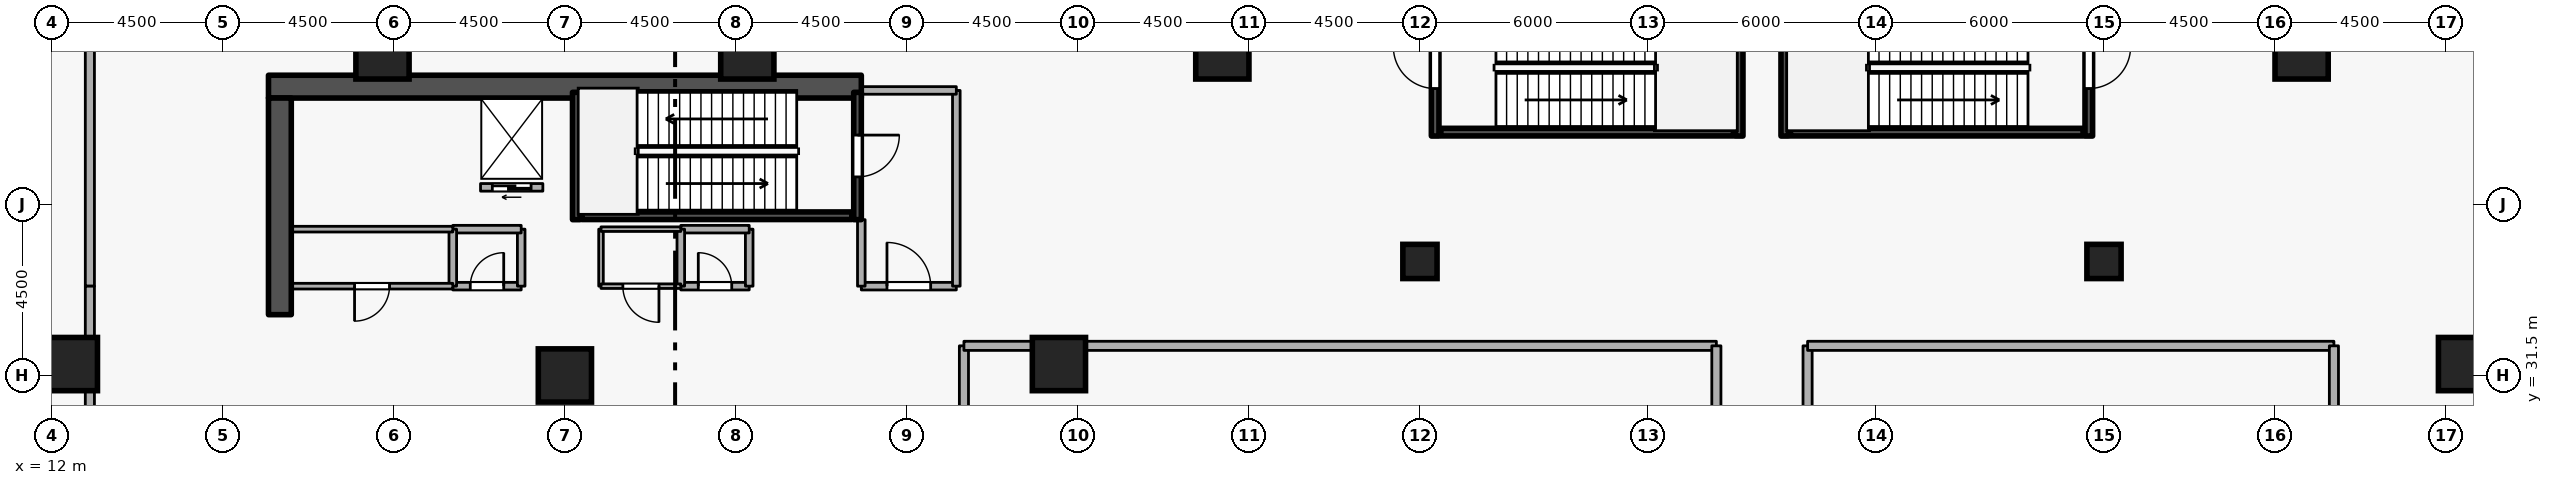
"""IFC4 building model, lengths in metres.
Left out: names, types, materials, properties, quantities, classifications, styles, units other than length and angle.
Written with IfcOpenShell. Run it as: python <this file> out.ifc"""

import sys

from ifc_helpers import new_model, si_unit, direction, frame, frame_2d, origin, origin_2d, place, context, subcontext, project, spatial, rectangle, extrude, element, fill, save


model = new_model("IFC4")
c1 = context("Model", 3, precision=1e-05, world=origin(), true_north=direction((0.0, 1.0)))
c2 = subcontext(c1, "Body", "Model", "MODEL_VIEW")
j1 = project(units=[si_unit("LENGTHUNIT", "METRE"), si_unit("PLANEANGLEUNIT", "RADIAN")], contexts=[c1])
p1 = place(None, origin())
s1 = spatial("IfcSite", under=j1, at=p1, CompositionType="ELEMENT")
p2 = place(p1, origin())
s2 = spatial("IfcBuilding", under=s1, at=p2, CompositionType="ELEMENT")
p3 = place(p2, frame((0.0, 0.0, -5.4)))
s3 = spatial("IfcBuildingStorey", under=s2, at=p3, CompositionType="ELEMENT", Elevation=-5.4)
p4 = place(p3, frame((17.7, 39.1, -0.6), z_axis=(0.0, 0.0, 1.0), x_axis=(1.0, 0.0, 0.0)))
e1 = element("IfcWall", 1, at=p4, inside=s3, PredefinedType="SHEAR", context=c2, shape_type="SweptSolid", body=[
    extrude(rectangle(XDim=15.6, YDim=0.6, at=frame_2d((7.8, 0.0))), origin(), (0.0, 0.0, 1.0), 6.0),
])
p5 = place(p3, frame((18.0, 33.1, -0.6), z_axis=(0.0, 0.0, 1.0), x_axis=(0.0, 1.0, 0.0)))
e2 = element("IfcWall", 2, at=p5, inside=s3, PredefinedType="SHEAR", context=c2, shape_type="SweptSolid", body=[
    extrude(rectangle(XDim=5.7, YDim=0.6, at=frame_2d((2.85, 0.0))), origin(), (0.0, 0.0, 1.0), 6.0),
])
for number, where, z_axis, x_axis in (
    (3, (42.8, 40.0, -0.6), (0.0, 0.0, 1.0), (1.0, 0.0, 0.0)),
    (4, (12.5, 31.8, -0.6), (0.0, 0.0, 1.0), (1.0, 0.0, 0.0)),
    (5, (38.5, 31.8, -0.6), (0.0, 0.0, 1.0), (1.0, 0.0, 0.0)),
    (6, (20.7, 40.0, -0.6), (0.0, 0.0, 1.0), (1.0, 0.0, 0.0)),
    (7, (30.3, 40.0, -0.6), (0.0, 0.0, 1.0), (1.0, 0.0, 0.0)),
    (8, (25.5, 31.5, -0.6), (0.0, 0.0, 1.0), (1.0, 0.0, 0.0)),
    (9, (71.2, 40.0, -0.6), (0.0, 0.0, 1.0), (1.0, 0.0, 0.0)),
    (10, (75.5, 31.8, -0.6), (0.0, 0.0, 1.0), (1.0, 0.0, 0.0)),
):
    element("IfcColumn", number, at=place(p3, frame(where, z_axis=z_axis, x_axis=x_axis)), inside=s3, PredefinedType="COLUMN", context=c2, shape_type="SweptSolid", body=[
        extrude(rectangle(XDim=1.4, YDim=1.4, at=origin_2d()), origin(), (0.0, 0.0, 1.0), 6.0),
    ])
for number, where, z_axis, x_axis in (
    (11, (48.0, 34.5, -0.6), (0.0, 0.0, 1.0), (1.0, 0.0, 0.0)),
    (12, (66.0, 34.5, -0.6), (0.0, 0.0, 1.0), (1.0, 0.0, 0.0)),
):
    element("IfcColumn", number, at=place(p3, frame(where, z_axis=z_axis, x_axis=x_axis)), inside=s3, PredefinedType="COLUMN", context=c2, shape_type="SweptSolid", body=[
        extrude(rectangle(XDim=0.9, YDim=0.9, at=origin_2d()), origin(), (0.0, 0.0, 1.0), 6.0),
    ])
p6 = place(p3, frame((24.92, 36.45, 0.0), z_axis=(0.0, 0.0, 1.0), x_axis=(-1.0, 0.0, 0.0)))
e13 = element("IfcWall", 13, at=p6, inside=s3, PredefinedType="STANDARD", context=c2, shape_type="SweptSolid", body=[
    extrude(rectangle(XDim=1.64, YDim=0.2, at=frame_2d((0.82, 0.0))), origin(), (0.0, 0.0, 1.0), 5.06),
])
p7 = place(p6, frame((0.31, 0.0, 0.0)))
e14 = element("IfcOpeningElement", 14, at=p7, cuts=e13, PredefinedType="OPENING", context=c2, shape_type="SweptSolid", body=[
    extrude(rectangle(XDim=1.02, YDim=2.06, at=frame_2d((0.51, 1.03))), frame((0.0, 0.11, 0.0), z_axis=(0.0, -1.0, 0.0), x_axis=(1.0, 0.0, 0.0)), (0.0, 0.0, 1.0), 0.22),
])
p8 = place(p3, frame((33.2, 38.95, -0.6), z_axis=(0.0, 0.0, 1.0), x_axis=(0.0, -1.0, 0.0)))
e15 = element("IfcWall", 15, at=p8, inside=s3, PredefinedType="SHEAR", context=c2, shape_type="SweptSolid", body=[
    extrude(rectangle(XDim=3.35, YDim=0.2, at=frame_2d((1.675, 0.0))), origin(), (0.0, 0.0, 1.0), 6.0),
])
p9 = place(p8, frame((1.125, 0.0, 0.6)))
e16 = element("IfcOpeningElement", 16, at=p9, cuts=e15, PredefinedType="OPENING", context=c2, shape_type="SweptSolid", body=[
    extrude(rectangle(XDim=1.1, YDim=2.1, at=frame_2d((0.55, 1.05))), frame((0.0, 0.11, 0.0), z_axis=(0.0, -1.0, 0.0), x_axis=(1.0, 0.0, 0.0)), (0.0, 0.0, 1.0), 0.22),
])
p10 = place(p3, frame((25.8, 35.6, -0.6), z_axis=(0.0, 0.0, 1.0), x_axis=(0.0, 1.0, 0.0)))
e17 = element("IfcWall", 17, at=p10, inside=s3, PredefinedType="SHEAR", context=c2, shape_type="SweptSolid", body=[
    extrude(rectangle(XDim=3.35, YDim=0.2, at=frame_2d((1.675, 0.0))), origin(), (0.0, 0.0, 1.0), 6.0),
])
p11 = place(p3, frame((25.95, 35.703, -0.6), z_axis=(0.0, 0.0, 1.0), x_axis=(1.0, 0.0, 0.0)))
e18 = element("IfcWall", 18, at=p11, inside=s3, PredefinedType="SHEAR", context=c2, shape_type="SweptSolid", body=[
    extrude(rectangle(XDim=7.1, YDim=0.2, at=frame_2d((3.55, 0.0))), origin(), (0.0, 0.0, 1.0), 6.0),
])
p12 = place(p3, frame((48.4, 37.8, -0.6), z_axis=(0.0, 0.0, 1.0), x_axis=(0.0, 1.0, 0.0)))
e19 = element("IfcWall", 19, at=p12, inside=s3, PredefinedType="SHEAR", context=c2, shape_type="SweptSolid", body=[
    extrude(rectangle(XDim=3.6, YDim=0.2, at=frame_2d((1.8, 0.0))), origin(), (0.0, 0.0, 1.0), 6.0),
])
p13 = place(p12, frame((1.25, 0.0, 0.6)))
e20 = element("IfcOpeningElement", 20, at=p13, cuts=e19, PredefinedType="OPENING", context=c2, shape_type="SweptSolid", body=[
    extrude(rectangle(XDim=1.1, YDim=2.1, at=frame_2d((0.55, 1.05))), frame((0.0, 0.11, 0.0), z_axis=(0.0, -1.0, 0.0), x_axis=(1.0, 0.0, 0.0)), (0.0, 0.0, 1.0), 0.22),
])
p14 = place(p3, frame((56.4, 41.4, -0.6), z_axis=(0.0, 0.0, 1.0), x_axis=(0.0, -1.0, 0.0)))
e21 = element("IfcWall", 21, at=p14, inside=s3, PredefinedType="SHEAR", context=c2, shape_type="SweptSolid", body=[
    extrude(rectangle(XDim=3.6, YDim=0.2, at=frame_2d((1.8, 0.0))), origin(), (0.0, 0.0, 1.0), 6.0),
])
p15 = place(p3, frame((48.55, 37.903, -0.6), z_axis=(0.0, 0.0, 1.0), x_axis=(1.0, 0.0, 0.0)))
e22 = element("IfcWall", 22, at=p15, inside=s3, PredefinedType="SHEAR", context=c2, shape_type="SweptSolid", body=[
    extrude(rectangle(XDim=7.7, YDim=0.2, at=frame_2d((3.85, 0.0))), origin(), (0.0, 0.0, 1.0), 6.0),
])
p16 = place(p3, frame((65.6, 41.4, -0.6), z_axis=(0.0, 0.0, 1.0), x_axis=(0.0, -1.0, 0.0)))
e23 = element("IfcWall", 23, at=p16, inside=s3, PredefinedType="SHEAR", context=c2, shape_type="SweptSolid", body=[
    extrude(rectangle(XDim=3.6, YDim=0.2, at=frame_2d((1.8, 0.0))), origin(), (0.0, 0.0, 1.0), 6.0),
])
p17 = place(p16, frame((1.25, 0.0, 0.6)))
e24 = element("IfcOpeningElement", 24, at=p17, cuts=e23, PredefinedType="OPENING", context=c2, shape_type="SweptSolid", body=[
    extrude(rectangle(XDim=1.1, YDim=2.1, at=frame_2d((0.55, 1.05))), frame((0.0, 0.11, 0.0), z_axis=(0.0, -1.0, 0.0), x_axis=(1.0, 0.0, 0.0)), (0.0, 0.0, 1.0), 0.22),
])
p18 = place(p3, frame((57.6, 37.8, -0.6), z_axis=(0.0, 0.0, 1.0), x_axis=(0.0, 1.0, 0.0)))
e25 = element("IfcWall", 25, at=p18, inside=s3, PredefinedType="SHEAR", context=c2, shape_type="SweptSolid", body=[
    extrude(rectangle(XDim=3.6, YDim=0.2, at=frame_2d((1.8, 0.0))), origin(), (0.0, 0.0, 1.0), 6.0),
])
p19 = place(p3, frame((57.75, 37.903, -0.6), z_axis=(0.0, 0.0, 1.0), x_axis=(1.0, 0.0, 0.0)))
e26 = element("IfcWall", 26, at=p19, inside=s3, PredefinedType="SHEAR", context=c2, shape_type="SweptSolid", body=[
    extrude(rectangle(XDim=7.7, YDim=0.2, at=frame_2d((3.85, 0.0))), origin(), (0.0, 0.0, 1.0), 6.0),
])
p20 = place(p3, frame((33.3, 33.85, 0.0), z_axis=(0.0, 0.0, 1.0), x_axis=(1.0, 0.0, 0.0)))
e27 = element("IfcWall", 27, at=p20, inside=s3, PredefinedType="STANDARD", context=c2, shape_type="SweptSolid", body=[
    extrude(rectangle(XDim=2.5, YDim=0.2, at=frame_2d((1.25, 0.0))), origin(), (0.0, 0.0, 1.0), 5.06),
])
p21 = place(p20, frame((0.675, 0.0, 0.0)))
e28 = element("IfcOpeningElement", 28, at=p21, cuts=e27, PredefinedType="OPENING", context=c2, shape_type="SweptSolid", body=[
    extrude(rectangle(XDim=1.15, YDim=2.1, at=frame_2d((0.575, 1.05))), frame((0.0, 0.11, 0.0), z_axis=(0.0, -1.0, 0.0), x_axis=(1.0, 0.0, 0.0)), (0.0, 0.0, 1.0), 0.22),
])
p22 = place(p3, frame((35.8, 33.85, 0.0), z_axis=(0.0, 0.0, 1.0), x_axis=(0.0, 1.0, 0.0)))
e29 = element("IfcWall", 29, at=p22, inside=s3, PredefinedType="STANDARD", context=c2, shape_type="SweptSolid", body=[
    extrude(rectangle(XDim=5.15, YDim=0.2, at=frame_2d((2.575, 0.0))), origin(), (0.0, 0.0, 1.0), 5.06),
])
p23 = place(p3, frame((35.8, 39.0, 0.0), z_axis=(0.0, 0.0, 1.0), x_axis=(-1.0, 0.0, 0.0)))
e30 = element("IfcWall", 30, at=p23, inside=s3, PredefinedType="STANDARD", context=c2, shape_type="SweptSolid", body=[
    extrude(rectangle(XDim=2.5, YDim=0.2, at=frame_2d((1.25, 0.0))), origin(), (0.0, 0.0, 1.0), 5.06),
])
p24 = place(p3, frame((33.3, 35.6, 0.0), z_axis=(0.0, 0.0, 1.0), x_axis=(0.0, -1.0, 0.0)))
e31 = element("IfcWall", 31, at=p24, inside=s3, PredefinedType="STANDARD", context=c2, shape_type="SweptSolid", body=[
    extrude(rectangle(XDim=1.75, YDim=0.2, at=frame_2d((0.875, 0.0))), origin(), (0.0, 0.0, 1.0), 4.265),
])
p25 = place(p3, frame((22.55, 33.85, 0.0), z_axis=(0.0, 0.0, 1.0), x_axis=(1.0, 0.0, 0.0)))
e32 = element("IfcWall", 32, at=p25, inside=s3, PredefinedType="STANDARD", context=c2, shape_type="SweptSolid", body=[
    extrude(rectangle(XDim=1.8, YDim=0.2, at=frame_2d((0.9, 0.0))), origin(), (0.0, 0.0, 1.0), 5.06),
])
p26 = place(p25, frame((0.46, 0.0, 0.0)))
e33 = element("IfcOpeningElement", 33, at=p26, cuts=e32, PredefinedType="OPENING", context=c2, shape_type="SweptSolid", body=[
    extrude(rectangle(XDim=0.88, YDim=2.04, at=frame_2d((0.44, 1.02))), frame((0.0, 0.11, 0.0), z_axis=(0.0, -1.0, 0.0), x_axis=(1.0, 0.0, 0.0)), (0.0, 0.0, 1.0), 0.22),
])
p27 = place(p3, frame((24.35, 33.85, 0.0), z_axis=(0.0, 0.0, 1.0), x_axis=(0.0, 1.0, 0.0)))
e34 = element("IfcWall", 34, at=p27, inside=s3, PredefinedType="STANDARD", context=c2, shape_type="SweptSolid", body=[
    extrude(rectangle(XDim=1.5, YDim=0.2, at=frame_2d((0.75, 0.0))), origin(), (0.0, 0.0, 1.0), 5.06),
])
p28 = place(p3, frame((24.35, 35.35, 0.0), z_axis=(0.0, 0.0, 1.0), x_axis=(-1.0, 0.0, 0.0)))
e35 = element("IfcWall", 35, at=p28, inside=s3, PredefinedType="STANDARD", context=c2, shape_type="SweptSolid", body=[
    extrude(rectangle(XDim=1.8, YDim=0.2, at=frame_2d((0.9, 0.0))), origin(), (0.0, 0.0, 1.0), 5.06),
])
p29 = place(p3, frame((22.55, 35.35, 0.0), z_axis=(0.0, 0.0, 1.0), x_axis=(0.0, -1.0, 0.0)))
e36 = element("IfcWall", 36, at=p29, inside=s3, PredefinedType="STANDARD", context=c2, shape_type="SweptSolid", body=[
    extrude(rectangle(XDim=1.5, YDim=0.2, at=frame_2d((0.75, 0.0))), origin(), (0.0, 0.0, 1.0), 5.06),
])
p30 = place(p3, frame((28.55, 33.85, 0.0), z_axis=(0.0, 0.0, 1.0), x_axis=(1.0, 0.0, 0.0)))
e37 = element("IfcWall", 37, at=p30, inside=s3, PredefinedType="STANDARD", context=c2, shape_type="SweptSolid", body=[
    extrude(rectangle(XDim=1.8, YDim=0.2, at=frame_2d((0.9, 0.0))), origin(), (0.0, 0.0, 1.0), 5.06),
])
p31 = place(p30, frame((0.46, 0.0, 0.0)))
e38 = element("IfcOpeningElement", 38, at=p31, cuts=e37, PredefinedType="OPENING", context=c2, shape_type="SweptSolid", body=[
    extrude(rectangle(XDim=0.88, YDim=2.04, at=frame_2d((0.44, 1.02))), frame((0.0, 0.11, 0.0), z_axis=(0.0, -1.0, 0.0), x_axis=(1.0, 0.0, 0.0)), (0.0, 0.0, 1.0), 0.22),
])
p32 = place(p3, frame((30.35, 33.85, 0.0), z_axis=(0.0, 0.0, 1.0), x_axis=(0.0, 1.0, 0.0)))
e39 = element("IfcWall", 39, at=p32, inside=s3, PredefinedType="STANDARD", context=c2, shape_type="SweptSolid", body=[
    extrude(rectangle(XDim=1.5, YDim=0.2, at=frame_2d((0.75, 0.0))), origin(), (0.0, 0.0, 1.0), 5.06),
])
p33 = place(p3, frame((30.35, 35.35, 0.0), z_axis=(0.0, 0.0, 1.0), x_axis=(-1.0, 0.0, 0.0)))
e40 = element("IfcWall", 40, at=p33, inside=s3, PredefinedType="STANDARD", context=c2, shape_type="SweptSolid", body=[
    extrude(rectangle(XDim=1.8, YDim=0.2, at=frame_2d((0.9, 0.0))), origin(), (0.0, 0.0, 1.0), 5.06),
])
p34 = place(p3, frame((28.55, 35.35, 0.0), z_axis=(0.0, 0.0, 1.0), x_axis=(0.0, -1.0, 0.0)))
e41 = element("IfcWall", 41, at=p34, inside=s3, PredefinedType="STANDARD", context=c2, shape_type="SweptSolid", body=[
    extrude(rectangle(XDim=1.5, YDim=0.2, at=frame_2d((0.75, 0.0))), origin(), (0.0, 0.0, 1.0), 5.06),
])
p35 = place(p3, frame((36.0, 22.3, 0.0), z_axis=(0.0, 0.0, 1.0), x_axis=(0.0, 1.0, 0.0)))
e42 = element("IfcWall", 42, at=p35, inside=s3, PredefinedType="STANDARD", context=c2, shape_type="SweptSolid", body=[
    extrude(rectangle(XDim=9.98, YDim=0.24, at=frame_2d((4.99, 0.0))), origin(), (0.0, 0.0, 1.0), 5.06),
])
p36 = place(p3, frame((36.0, 32.28, 0.0), z_axis=(0.0, 0.0, 1.0), x_axis=(1.0, 0.0, 0.0)))
e43 = element("IfcWall", 43, at=p36, inside=s3, PredefinedType="STANDARD", context=c2, shape_type="SweptSolid", body=[
    extrude(rectangle(XDim=19.8, YDim=0.24, at=frame_2d((9.9, 0.0))), origin(), (0.0, 0.0, 1.0), 5.06),
])
for number, where, z_axis, x_axis in (
    (44, (55.8, 32.28, 0.0), (0.0, 0.0, 1.0), (0.0, -1.0, 0.0)),
    (45, (58.2, 22.3, 0.0), (0.0, 0.0, 1.0), (0.0, 1.0, 0.0)),
):
    element("IfcWall", number, at=place(p3, frame(where, z_axis=z_axis, x_axis=x_axis)), inside=s3, PredefinedType="STANDARD", context=c2, shape_type="SweptSolid", body=[
        extrude(rectangle(XDim=9.98, YDim=0.24, at=frame_2d((4.99, 0.0))), origin(), (0.0, 0.0, 1.0), 5.06),
    ])
p37 = place(p3, frame((58.2, 32.28, 0.0), z_axis=(0.0, 0.0, 1.0), x_axis=(1.0, 0.0, 0.0)))
e46 = element("IfcWall", 46, at=p37, inside=s3, PredefinedType="STANDARD", context=c2, shape_type="SweptSolid", body=[
    extrude(rectangle(XDim=13.85, YDim=0.24, at=frame_2d((6.925, 0.0))), origin(), (0.0, 0.0, 1.0), 5.06),
])
p38 = place(p3, frame((72.05, 32.28, 0.0), z_axis=(0.0, 0.0, 1.0), x_axis=(0.0, -1.0, 0.0)))
e47 = element("IfcWall", 47, at=p38, inside=s3, PredefinedType="STANDARD", context=c2, shape_type="SweptSolid", body=[
    extrude(rectangle(XDim=9.98, YDim=0.24, at=frame_2d((4.99, 0.0))), origin(), (0.0, 0.0, 1.0), 5.06),
])
p39 = place(p3, frame((13.0, 47.0, 0.0), z_axis=(0.0, 0.0, 1.0), x_axis=(0.0, -1.0, 0.0)))
e48 = element("IfcWall", 48, at=p39, inside=s3, PredefinedType="STANDARD", context=c2, shape_type="SweptSolid", body=[
    extrude(rectangle(XDim=13.15, YDim=0.24, at=frame_2d((6.575, 0.0))), origin(), (0.0, 0.0, 1.0), 5.06),
])
p40 = place(p3, frame((13.0, 33.85, 0.0), z_axis=(0.0, 0.0, 1.0), x_axis=(0.0, -1.0, 0.0)))
e49 = element("IfcWall", 49, at=p40, inside=s3, PredefinedType="STANDARD", context=c2, shape_type="SweptSolid", body=[
    extrude(rectangle(XDim=2.15, YDim=0.24, at=frame_2d((1.075, 0.0))), origin(), (0.0, 0.0, 1.0), 5.06),
])
p41 = place(p3, frame((13.0, 31.7, 0.0), z_axis=(0.0, 0.0, 1.0), x_axis=(0.0, -1.0, 0.0)))
e50 = element("IfcWall", 50, at=p41, inside=s3, PredefinedType="STANDARD", context=c2, shape_type="SweptSolid", body=[
    extrude(rectangle(XDim=9.98, YDim=0.24, at=frame_2d((4.99, 0.0))), origin(), (0.0, 0.0, 1.0), 5.06),
])
p42 = place(p3, frame((18.3, 35.35, 0.0), z_axis=(0.0, 0.0, 1.0), x_axis=(1.0, 0.0, 0.0)))
e51 = element("IfcWall", 51, at=p42, inside=s3, PredefinedType="PARTITIONING", context=c2, shape_type="SweptSolid", body=[
    extrude(rectangle(XDim=4.25, YDim=0.15, at=frame_2d((2.125, 0.0))), origin(), (0.0, 0.0, 1.0), 5.06),
])
p43 = place(p3, frame((22.55, 33.85, 0.0), z_axis=(0.0, 0.0, 1.0), x_axis=(-1.0, 0.0, 0.0)))
e52 = element("IfcWall", 52, at=p43, inside=s3, PredefinedType="PARTITIONING", context=c2, shape_type="SweptSolid", body=[
    extrude(rectangle(XDim=4.25, YDim=0.15, at=frame_2d((2.125, 0.0))), origin(), (0.0, 0.0, 1.0), 5.06),
])
p44 = place(p43, frame((1.665, 0.0, 0.0)))
e53 = element("IfcOpeningElement", 53, at=p44, cuts=e52, PredefinedType="OPENING", context=c2, shape_type="SweptSolid", body=[
    extrude(rectangle(XDim=0.92, YDim=2.08, at=frame_2d((0.46, 1.04))), frame((0.0, 0.085, 0.0), z_axis=(0.0, -1.0, 0.0), x_axis=(1.0, 0.0, 0.0)), (0.0, 0.0, 1.0), 0.17),
])
p45 = place(p3, frame((26.45, 33.85, 0.0), z_axis=(0.0, 0.0, 1.0), x_axis=(0.0, 1.0, 0.0)))
e54 = element("IfcWall", 54, at=p45, inside=s3, PredefinedType="PARTITIONING", context=c2, shape_type="SweptSolid", body=[
    extrude(rectangle(XDim=1.5, YDim=0.12, at=frame_2d((0.75, 0.0))), origin(), (0.0, 0.0, 1.0), 5.06),
])
p46 = place(p3, frame((26.45, 35.35, 0.0), z_axis=(0.0, 0.0, 1.0), x_axis=(1.0, 0.0, 0.0)))
e55 = element("IfcWall", 55, at=p46, inside=s3, PredefinedType="PARTITIONING", context=c2, shape_type="SweptSolid", body=[
    extrude(rectangle(XDim=2.1, YDim=0.12, at=frame_2d((1.05, 0.0))), origin(), (0.0, 0.0, 1.0), 5.06),
])
p47 = place(p3, frame((28.55, 33.85, 0.0), z_axis=(0.0, 0.0, 1.0), x_axis=(-1.0, 0.0, 0.0)))
e56 = element("IfcWall", 56, at=p47, inside=s3, PredefinedType="PARTITIONING", context=c2, shape_type="SweptSolid", body=[
    extrude(rectangle(XDim=2.1, YDim=0.12, at=frame_2d((1.05, 0.0))), origin(), (0.0, 0.0, 1.0), 5.06),
])
p48 = place(p47, frame((0.575, 0.0, 0.0)))
e57 = element("IfcOpeningElement", 57, at=p48, cuts=e56, PredefinedType="OPENING", context=c2, shape_type="SweptSolid", body=[
    extrude(rectangle(XDim=0.95, YDim=2.1, at=frame_2d((0.475, 1.05))), frame((0.0, 0.07, 0.0), z_axis=(0.0, -1.0, 0.0), x_axis=(1.0, 0.0, 0.0)), (0.0, 0.0, 1.0), 0.14),
])
p49 = place(p7, origin())
e58 = element("IfcDoor", 58, at=p49, inside=s3, OperationType="SLIDING_TO_LEFT", PredefinedType="DOOR", context=c2, shape_type="SweptSolid", body=[
    extrude(rectangle(XDim=1.02, YDim=2.06, at=frame_2d((0.51, 1.03))), frame((0.0, 0.025, 0.0), z_axis=(0.0, -1.0, 0.0), x_axis=(1.0, 0.0, 0.0)), (0.0, 0.0, 1.0), 0.05),
])
fill(e14, e58)
p50 = place(p9, origin())
e59 = element("IfcDoor", 59, at=p50, inside=s3, OperationType="SINGLE_SWING_LEFT", PredefinedType="DOOR", context=c2, shape_type="SweptSolid", body=[
    extrude(rectangle(XDim=1.1, YDim=2.1, at=frame_2d((0.55, 1.05))), frame((0.0, 0.025, 0.0), z_axis=(0.0, -1.0, 0.0), x_axis=(1.0, 0.0, 0.0)), (0.0, 0.0, 1.0), 0.05),
])
fill(e16, e59)
p51 = place(p13, origin())
e60 = element("IfcDoor", 60, at=p51, inside=s3, OperationType="SINGLE_SWING_RIGHT", PredefinedType="DOOR", context=c2, shape_type="SweptSolid", body=[
    extrude(rectangle(XDim=1.1, YDim=2.1, at=frame_2d((0.55, 1.05))), frame((0.0, 0.025, 0.0), z_axis=(0.0, -1.0, 0.0), x_axis=(1.0, 0.0, 0.0)), (0.0, 0.0, 1.0), 0.05),
])
fill(e20, e60)
p52 = place(p17, origin())
e61 = element("IfcDoor", 61, at=p52, inside=s3, OperationType="SINGLE_SWING_LEFT", PredefinedType="DOOR", context=c2, shape_type="SweptSolid", body=[
    extrude(rectangle(XDim=1.1, YDim=2.1, at=frame_2d((0.55, 1.05))), frame((0.0, 0.025, 0.0), z_axis=(0.0, -1.0, 0.0), x_axis=(1.0, 0.0, 0.0)), (0.0, 0.0, 1.0), 0.05),
])
fill(e24, e61)
p53 = place(p21, origin())
e62 = element("IfcDoor", 62, at=p53, inside=s3, OperationType="SINGLE_SWING_LEFT", PredefinedType="DOOR", context=c2, shape_type="SweptSolid", body=[
    extrude(rectangle(XDim=1.15, YDim=2.1, at=frame_2d((0.575, 1.05))), frame((0.0, 0.025, 0.0), z_axis=(0.0, -1.0, 0.0), x_axis=(1.0, 0.0, 0.0)), (0.0, 0.0, 1.0), 0.05),
])
fill(e28, e62)
p54 = place(p26, origin())
e63 = element("IfcDoor", 63, at=p54, inside=s3, OperationType="SINGLE_SWING_RIGHT", PredefinedType="DOOR", context=c2, shape_type="SweptSolid", body=[
    extrude(rectangle(XDim=0.88, YDim=2.04, at=frame_2d((0.44, 1.02))), frame((0.0, 0.025, 0.0), z_axis=(0.0, -1.0, 0.0), x_axis=(1.0, 0.0, 0.0)), (0.0, 0.0, 1.0), 0.05),
])
fill(e33, e63)
p55 = place(p31, origin())
e64 = element("IfcDoor", 64, at=p55, inside=s3, OperationType="SINGLE_SWING_LEFT", PredefinedType="DOOR", context=c2, shape_type="SweptSolid", body=[
    extrude(rectangle(XDim=0.88, YDim=2.04, at=frame_2d((0.44, 1.02))), frame((0.0, 0.025, 0.0), z_axis=(0.0, -1.0, 0.0), x_axis=(1.0, 0.0, 0.0)), (0.0, 0.0, 1.0), 0.05),
])
fill(e38, e64)
p56 = place(p44, origin())
e65 = element("IfcDoor", 65, at=p56, inside=s3, OperationType="SINGLE_SWING_RIGHT", PredefinedType="DOOR", context=c2, shape_type="SweptSolid", body=[
    extrude(rectangle(XDim=0.92, YDim=2.08, at=frame_2d((0.46, 1.04))), frame((0.0, 0.025, 0.0), z_axis=(0.0, -1.0, 0.0), x_axis=(1.0, 0.0, 0.0)), (0.0, 0.0, 1.0), 0.05),
])
fill(e53, e65)
p57 = place(p48, origin())
e66 = element("IfcDoor", 66, at=p57, inside=s3, OperationType="SINGLE_SWING_LEFT", PredefinedType="DOOR", context=c2, shape_type="SweptSolid", body=[
    extrude(rectangle(XDim=0.95, YDim=2.1, at=frame_2d((0.475, 1.05))), frame((0.0, 0.025, 0.0), z_axis=(0.0, -1.0, 0.0), x_axis=(1.0, 0.0, 0.0)), (0.0, 0.0, 1.0), 0.05),
])
fill(e57, e66)
save(model, sys.argv[1])
